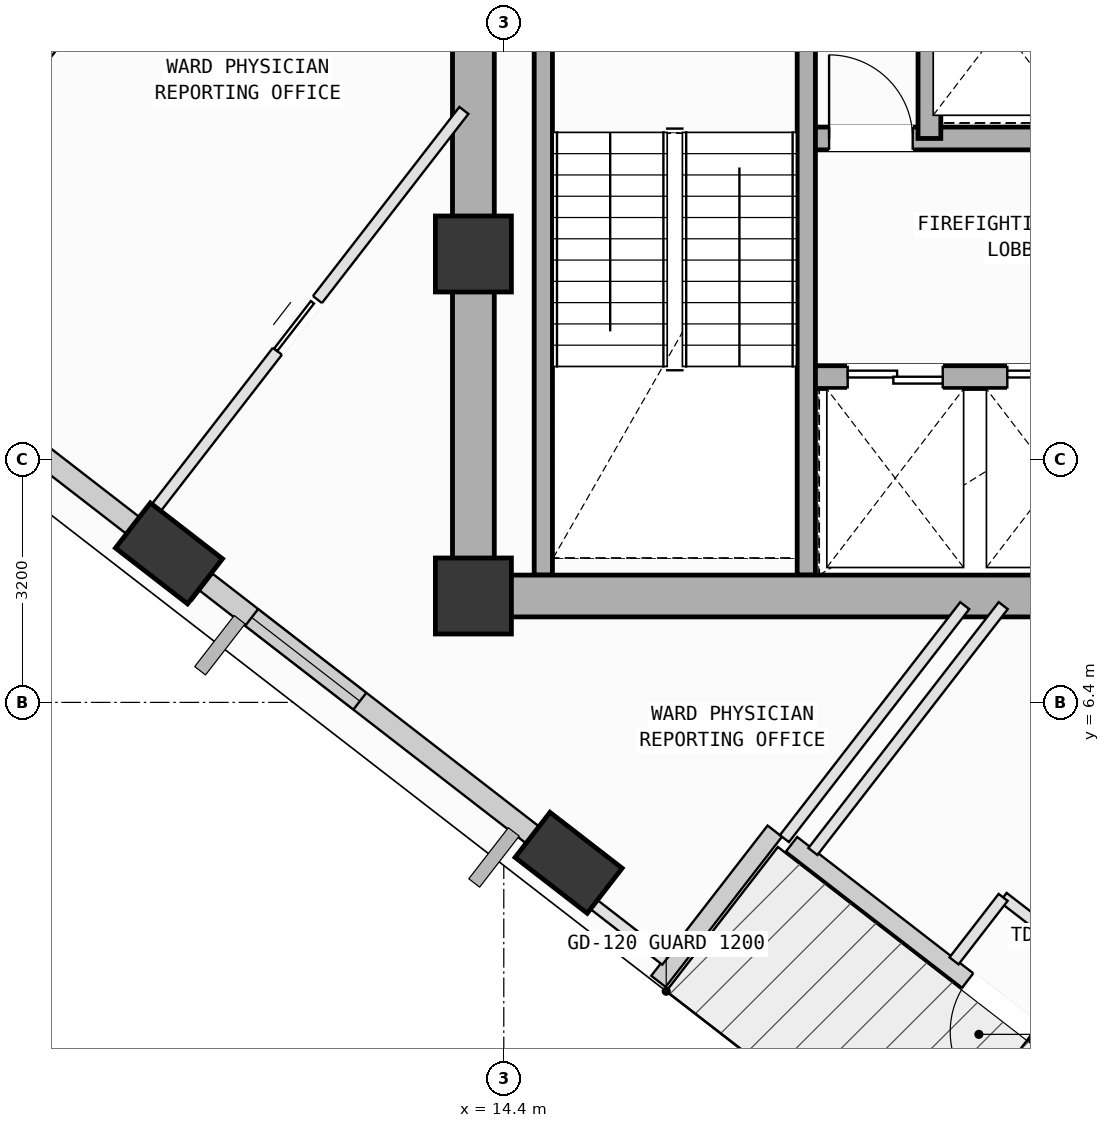
"""IFC4 building model, lengths in metres.
Left out: names, types, materials, properties, quantities, classifications, styles, units other than length and angle.
Written with IfcOpenShell. Run it as: python <this file> out.ifc"""

import sys

from ifc_helpers import new_model, si_unit, direction, frame, frame_2d, origin, origin_2d, place, context, subcontext, project, spatial, rectangle, extrude, element, fill, save


model = new_model("IFC4")
c1 = context("Model", 3, precision=1e-05, world=origin(), true_north=direction((0.0, 1.0)))
c2 = subcontext(c1, "Body", "Model", "MODEL_VIEW")
j1 = project(units=[si_unit("LENGTHUNIT", "METRE"), si_unit("PLANEANGLEUNIT", "RADIAN")], contexts=[c1])
p1 = place(None, origin())
s1 = spatial("IfcSite", under=j1, at=p1, CompositionType="ELEMENT")
p2 = place(p1, origin())
s2 = spatial("IfcBuilding", under=s1, at=p2, CompositionType="ELEMENT")
p3 = place(p2, frame((0.0, 0.0, 247.2)))
s3 = spatial("IfcBuildingStorey", under=s2, at=p3, CompositionType="ELEMENT", Elevation=247.2)
for number, where, z_axis, x_axis in (
    (1, (14.0, 7.8, 0.0), (0.0, 0.0, 1.0), (1.0, 0.0, 0.0)),
    (2, (14.0, 12.3, 0.0), (0.0, 0.0, 1.0), (1.0, 0.0, 0.0)),
):
    element("IfcColumn", number, at=place(p3, frame(where, z_axis=z_axis, x_axis=x_axis)), inside=s3, PredefinedType="COLUMN", context=c2, shape_type="SweptSolid", body=[
        extrude(rectangle(XDim=1.0, YDim=1.0, at=origin_2d()), origin(), (0.0, 0.0, 1.0), 4.0),
    ])
p4 = place(p3, frame((9.995, 8.36, 0.002), z_axis=(0.068486749732, -0.096572989879, 0.992966878973), x_axis=(-0.996627035573, 0.038482771556, 0.072481916762)))
e3 = element("IfcColumn", 3, at=p4, inside=s3, PredefinedType="COLUMN", context=c2, shape_type="SweptSolid", body=[
    extrude(rectangle(XDim=1.2, YDim=0.75, at=origin_2d()), origin(), (0.0, 0.0, 1.0), 4.025),
])
p5 = place(p3, frame((15.253, 4.289, 0.002), z_axis=(0.085097553282, -0.07490041423, 0.993553387782), x_axis=(-0.979007006368, -0.191646415867, 0.069404126443)))
e4 = element("IfcColumn", 4, at=p5, inside=s3, PredefinedType="COLUMN", context=c2, shape_type="SweptSolid", body=[
    extrude(rectangle(XDim=1.2, YDim=0.75, at=origin_2d()), origin(), (0.0, 0.0, 1.0), 4.022),
])
p6 = place(p3, frame((23.69, 0.273, 0.0), z_axis=(0.0, 0.0, 1.0), x_axis=(-0.790674409878, 0.612236863937, 0.0)))
e5 = element("IfcWall", 5, at=p6, inside=s3, PredefinedType="SOLIDWALL", context=c2, shape_type="SweptSolid", body=[
    extrude(rectangle(XDim=6.96, YDim=0.24, at=frame_2d((3.48, 0.0))), origin(), (0.0, 0.0, 1.0), 3.265),
])
p7 = place(p6, frame((2.93, 0.0, 0.0)))
e6 = element("IfcOpeningElement", 6, at=p7, cuts=e5, PredefinedType="OPENING", context=c2, shape_type="SweptSolid", body=[
    extrude(rectangle(XDim=1.1, YDim=2.15, at=frame_2d((0.55, 1.075))), frame((0.0, 0.13, 0.0), z_axis=(0.0, -1.0, 0.0), x_axis=(1.0, 0.0, 0.0)), (0.0, 0.0, 1.0), 0.26),
])
p8 = place(p3, frame((17.966, 4.706, 0.0), z_axis=(0.0, 0.0, 1.0), x_axis=(-0.612194858421, -0.790706933903, 0.0)))
e7 = element("IfcWall", 7, at=p8, inside=s3, PredefinedType="SOLIDWALL", context=c2, shape_type="SweptSolid", body=[
    extrude(rectangle(XDim=2.5, YDim=0.24, at=frame_2d((1.25, 0.0))), origin(), (0.0, 0.0, 1.0), 3.265),
])
p9 = place(p3, frame((9.865, 8.461, 0.0), z_axis=(0.0, 0.0, 1.0), x_axis=(-0.790689704837, 0.612217110725, 0.0)))
e8 = element("IfcWall", 8, at=p9, inside=s3, PredefinedType="SOLIDWALL", context=c2, shape_type="SweptSolid", body=[
    extrude(rectangle(XDim=5.83, YDim=0.28, at=frame_2d((2.915, 0.0))), origin(), (0.0, 0.0, 1.0), 3.265),
])
p10 = place(p9, frame((2.117, 0.0, 0.75)))
e9 = element("IfcOpeningElement", 9, at=p10, cuts=e8, PredefinedType="OPENING", context=c2, shape_type="SweptSolid", body=[
    extrude(rectangle(XDim=1.4, YDim=1.85, at=frame_2d((0.7, 0.925))), frame((0.0, 0.15, 0.0), z_axis=(0.0, -1.0, 0.0), x_axis=(1.0, 0.0, 0.0)), (0.0, 0.0, 1.0), 0.3),
])
p11 = place(p3, frame((15.119, 4.393, 0.0), z_axis=(0.0, 0.0, 1.0), x_axis=(-0.790702891909, 0.612200079, 0.0)))
e10 = element("IfcWall", 10, at=p11, inside=s3, PredefinedType="SOLIDWALL", context=c2, shape_type="SweptSolid", body=[
    extrude(rectangle(XDim=5.861, YDim=0.28, at=frame_2d((2.93, 0.0))), origin(), (0.0, 0.0, 1.0), 3.265),
])
p12 = place(p11, frame((3.304, 0.0, 0.75)))
e11 = element("IfcOpeningElement", 11, at=p12, cuts=e10, PredefinedType="OPENING", context=c2, shape_type="SweptSolid", body=[
    extrude(rectangle(XDim=1.8, YDim=2.05, at=frame_2d((0.9, 1.025))), frame((0.0, 0.15, 0.0), z_axis=(0.0, -1.0, 0.0), x_axis=(1.0, 0.0, 0.0)), (0.0, 0.0, 1.0), 0.3),
])
for number, where, z_axis, x_axis in (
    (12, (18.38, 15.12, 0.0), (0.0, 0.0, 1.0), (0.0, -1.0, 0.0)),
    (13, (14.92, 8.075, 0.0), (0.0, 0.0, 1.0), (0.0, 1.0, 0.0)),
):
    element("IfcWall", number, at=place(p3, frame(where, z_axis=z_axis, x_axis=x_axis)), inside=s3, PredefinedType="SOLIDWALL", context=c2, shape_type="SweptSolid", body=[
        extrude(rectangle(XDim=7.045, YDim=0.24, at=frame_2d((3.522, 0.0))), origin(), (0.0, 0.0, 1.0), 3.78),
    ])
p13 = place(p3, frame((14.0, 7.8, 0.0), z_axis=(0.0, 0.0, 1.0), x_axis=(1.0, 0.0, 0.0)))
e14 = element("IfcWall", 14, at=p13, inside=s3, PredefinedType="SHEAR", context=c2, shape_type="SweptSolid", body=[
    extrude(rectangle(XDim=10.8, YDim=0.55, at=frame_2d((5.4, 0.0))), origin(), (0.0, 0.0, 1.0), 3.78),
])
p14 = place(p3, frame((14.0, 16.8, 0.0), z_axis=(0.0, 0.0, 1.0), x_axis=(0.0, -1.0, 0.0)))
e15 = element("IfcWall", 15, at=p14, inside=s3, PredefinedType="SHEAR", context=c2, shape_type="SweptSolid", body=[
    extrude(rectangle(XDim=9.0, YDim=0.55, at=frame_2d((4.5, 0.0))), origin(), (0.0, 0.0, 1.0), 3.78),
])
p15 = place(p3, frame((18.5, 10.68, 0.0), z_axis=(0.0, 0.0, 1.0), x_axis=(1.0, 0.0, 0.0)))
e16 = element("IfcWall", 16, at=p15, inside=s3, PredefinedType="SOLIDWALL", context=c2, shape_type="SweptSolid", body=[
    extrude(rectangle(XDim=5.3, YDim=0.3, at=frame_2d((2.65, 0.0))), origin(), (0.0, 0.0, 1.0), 3.78),
])
p16 = place(p15, frame((4.22, 0.0, 0.0)))
e17 = element("IfcOpeningElement", 17, at=p16, cuts=e16, PredefinedType="OPENING", context=c2, shape_type="SweptSolid", body=[
    extrude(rectangle(XDim=0.86, YDim=2.06, at=frame_2d((0.43, 1.03))), frame((0.0, 0.16, 0.0), z_axis=(0.0, -1.0, 0.0), x_axis=(1.0, 0.0, 0.0)), (0.0, 0.0, 1.0), 0.32),
])
p17 = place(p15, frame((0.425, 0.0, 0.0)))
e18 = element("IfcOpeningElement", 18, at=p17, cuts=e16, PredefinedType="OPENING", context=c2, shape_type="SweptSolid", body=[
    extrude(rectangle(XDim=1.25, YDim=2.18, at=frame_2d((0.625, 1.09))), frame((0.0, 0.16, 0.0), z_axis=(0.0, -1.0, 0.0), x_axis=(1.0, 0.0, 0.0)), (0.0, 0.0, 1.0), 0.32),
])
p18 = place(p15, frame((2.525, 0.0, 0.0)))
e19 = element("IfcOpeningElement", 19, at=p18, cuts=e16, PredefinedType="OPENING", context=c2, shape_type="SweptSolid", body=[
    extrude(rectangle(XDim=1.25, YDim=2.18, at=frame_2d((0.625, 1.09))), frame((0.0, 0.16, 0.0), z_axis=(0.0, -1.0, 0.0), x_axis=(1.0, 0.0, 0.0)), (0.0, 0.0, 1.0), 0.32),
])
p19 = place(p3, frame((18.5, 13.82, 0.0), z_axis=(0.0, 0.0, 1.0), x_axis=(1.0, 0.0, 0.0)))
e20 = element("IfcWall", 20, at=p19, inside=s3, PredefinedType="SOLIDWALL", context=c2, shape_type="SweptSolid", body=[
    extrude(rectangle(XDim=5.3, YDim=0.3, at=frame_2d((2.65, 0.0))), origin(), (0.0, 0.0, 1.0), 3.78),
])
p20 = place(p19, frame((0.18, 0.0, 0.0)))
e21 = element("IfcOpeningElement", 21, at=p20, cuts=e20, PredefinedType="OPENING", context=c2, shape_type="SweptSolid", body=[
    extrude(rectangle(XDim=1.1, YDim=2.15, at=frame_2d((0.55, 1.075))), frame((0.0, 0.16, 0.0), z_axis=(0.0, -1.0, 0.0), x_axis=(1.0, 0.0, 0.0)), (0.0, 0.0, 1.0), 0.32),
])
p21 = place(p3, frame((20.0, 13.82, 0.0), z_axis=(0.0, 0.0, 1.0), x_axis=(0.0, 1.0, 0.0)))
e22 = element("IfcWall", 22, at=p21, inside=s3, PredefinedType="SOLIDWALL", context=c2, shape_type="SweptSolid", body=[
    extrude(rectangle(XDim=2.73, YDim=0.3, at=frame_2d((1.365, 0.0))), origin(), (0.0, 0.0, 1.0), 3.78),
])
p22 = place(p3, frame((22.315, 2.793, 0.0), z_axis=(0.0, 0.0, 1.0), x_axis=(-0.790795428536, 0.612080542254, 0.0)))
e23 = element("IfcWall", 23, at=p22, inside=s3, PredefinedType="PARTITIONING", context=c2, shape_type="SweptSolid", body=[
    extrude(rectangle(XDim=1.701, YDim=0.15, at=frame_2d((0.85, 0.0))), origin(), (0.0, 0.0, 1.0), 3.78),
])
p23 = place(p3, frame((20.97, 3.834, 0.0), z_axis=(0.0, 0.0, 1.0), x_axis=(-0.611921285633, -0.790918668505, 0.0)))
e24 = element("IfcWall", 24, at=p23, inside=s3, PredefinedType="PARTITIONING", context=c2, shape_type="SweptSolid", body=[
    extrude(rectangle(XDim=1.056, YDim=0.15, at=frame_2d((0.528, 0.0))), origin(), (0.0, 0.0, 1.0), 3.78),
])
p24 = place(p3, frame((18.467, 4.438, 0.0), z_axis=(0.0, 0.0, 1.0), x_axis=(0.612067264166, 0.79080570568, 0.0)))
e25 = element("IfcWall", 25, at=p24, inside=s3, PredefinedType="PARTITIONING", context=c2, shape_type="SweptSolid", body=[
    extrude(rectangle(XDim=4.091, YDim=0.15, at=frame_2d((2.045, 0.0))), origin(), (0.0, 0.0, 1.0), 3.78),
])
p25 = place(p3, frame((20.465, 7.673, 0.0), z_axis=(0.0, 0.0, 1.0), x_axis=(-0.612173192991, -0.790723707614, 0.0)))
e26 = element("IfcWall", 26, at=p25, inside=s3, PredefinedType="PARTITIONING", context=c2, shape_type="SweptSolid", body=[
    extrude(rectangle(XDim=3.876, YDim=0.15, at=frame_2d((1.938, 0.0))), origin(), (0.0, 0.0, 1.0), 3.78),
])
p26 = place(p3, frame((16.531, 3.008, 0.0), z_axis=(0.0, 0.0, 1.0), x_axis=(-0.790582015175, 0.612356168648, 0.0)))
e27 = element("IfcWall", 27, at=p26, inside=s3, PredefinedType="PARTITIONING", context=c2, shape_type="SweptSolid", body=[
    extrude(rectangle(XDim=1.964, YDim=0.15, at=frame_2d((0.982, 0.0))), origin(), (0.0, 0.0, 1.0), 3.245),
])
p27 = place(p3, frame((10.344, 7.8, 0.0), z_axis=(0.0, 0.0, 1.0), x_axis=(-0.790811380368, 0.612059932261, 0.0)))
e28 = element("IfcWall", 28, at=p27, inside=s3, PredefinedType="PARTITIONING", context=c2, shape_type="SweptSolid", body=[
    extrude(rectangle(XDim=0.783, YDim=0.15, at=frame_2d((0.391, 0.0))), origin(), (0.0, 0.0, 1.0), 3.265),
])
p28 = place(p3, frame((9.67, 8.758, 0.0), z_axis=(0.0, 0.0, 1.0), x_axis=(0.612219073781, 0.790688184874, 0.0)))
e29 = element("IfcWall", 29, at=p28, inside=s3, PredefinedType="PARTITIONING", context=c2, shape_type="SweptSolid", body=[
    extrude(rectangle(XDim=6.869, YDim=0.15, at=frame_2d((3.434, 0.0))), origin(), (0.0, 0.0, 1.0), 3.78),
])
p29 = place(p28, frame((2.861, 0.0, 0.0)))
e30 = element("IfcOpeningElement", 30, at=p29, cuts=e29, PredefinedType="OPENING", context=c2, shape_type="SweptSolid", body=[
    extrude(rectangle(XDim=0.86, YDim=2.06, at=frame_2d((0.43, 1.03))), frame((0.0, 0.085, 0.0), z_axis=(0.0, -1.0, 0.0), x_axis=(1.0, 0.0, 0.0)), (0.0, 0.0, 1.0), 0.17),
])
p30 = place(p3, frame((5.874, 11.697, 0.0), z_axis=(0.0, 0.0, 1.0), x_axis=(0.612268172049, 0.790650166316, 0.0)))
e31 = element("IfcWall", 31, at=p30, inside=s3, PredefinedType="PARTITIONING", context=c2, shape_type="SweptSolid", body=[
    extrude(rectangle(XDim=13.634, YDim=0.15, at=frame_2d((6.817, 0.0))), origin(), (0.0, 0.0, 1.0), 3.78),
])
p31 = place(p7, origin())
e32 = element("IfcDoor", 32, at=p31, inside=s3, OperationType="SINGLE_SWING_LEFT", PredefinedType="DOOR", context=c2, shape_type="SweptSolid", body=[
    extrude(rectangle(XDim=1.1, YDim=2.15, at=frame_2d((0.55, 1.075))), frame((0.0, 0.025, 0.0), z_axis=(0.0, -1.0, 0.0), x_axis=(1.0, 0.0, 0.0)), (0.0, 0.0, 1.0), 0.05),
])
fill(e6, e32)
p32 = place(p12, origin())
e33 = element("IfcWindow", 33, at=p32, inside=s3, PartitioningType="SINGLE_PANEL", PredefinedType="WINDOW", context=c2, shape_type="SweptSolid", body=[
    extrude(rectangle(XDim=1.8, YDim=2.05, at=frame_2d((0.9, 1.025))), frame((0.0, 0.03, 0.0), z_axis=(0.0, -1.0, 0.0), x_axis=(1.0, 0.0, 0.0)), (0.0, 0.0, 1.0), 0.06),
])
fill(e11, e33)
p33 = place(p20, origin())
e34 = element("IfcDoor", 34, at=p33, inside=s3, OperationType="SINGLE_SWING_LEFT", PredefinedType="DOOR", context=c2, shape_type="SweptSolid", body=[
    extrude(rectangle(XDim=1.1, YDim=2.15, at=frame_2d((0.55, 1.075))), frame((0.0, 0.025, 0.0), z_axis=(0.0, -1.0, 0.0), x_axis=(1.0, 0.0, 0.0)), (0.0, 0.0, 1.0), 0.05),
])
fill(e21, e34)
p34 = place(p17, origin())
e35 = element("IfcDoor", 35, at=p34, inside=s3, OperationType="DOUBLE_DOOR_SLIDING", PredefinedType="DOOR", context=c2, shape_type="SweptSolid", body=[
    extrude(rectangle(XDim=1.25, YDim=2.18, at=frame_2d((0.625, 1.09))), frame((0.0, 0.025, 0.0), z_axis=(0.0, -1.0, 0.0), x_axis=(1.0, 0.0, 0.0)), (0.0, 0.0, 1.0), 0.05),
])
fill(e18, e35)
p35 = place(p18, origin())
e36 = element("IfcDoor", 36, at=p35, inside=s3, OperationType="DOUBLE_DOOR_SLIDING", PredefinedType="DOOR", context=c2, shape_type="SweptSolid", body=[
    extrude(rectangle(XDim=1.25, YDim=2.18, at=frame_2d((0.625, 1.09))), frame((0.0, 0.025, 0.0), z_axis=(0.0, -1.0, 0.0), x_axis=(1.0, 0.0, 0.0)), (0.0, 0.0, 1.0), 0.05),
])
fill(e19, e36)
p36 = place(p29, origin())
e37 = element("IfcDoor", 37, at=p36, inside=s3, OperationType="SLIDING_TO_LEFT", PredefinedType="DOOR", context=c2, shape_type="SweptSolid", body=[
    extrude(rectangle(XDim=0.86, YDim=2.06, at=frame_2d((0.43, 1.03))), frame((0.0, 0.025, 0.0), z_axis=(0.0, -1.0, 0.0), x_axis=(1.0, 0.0, 0.0)), (0.0, 0.0, 1.0), 0.05),
])
fill(e30, e37)
save(model, sys.argv[1])
